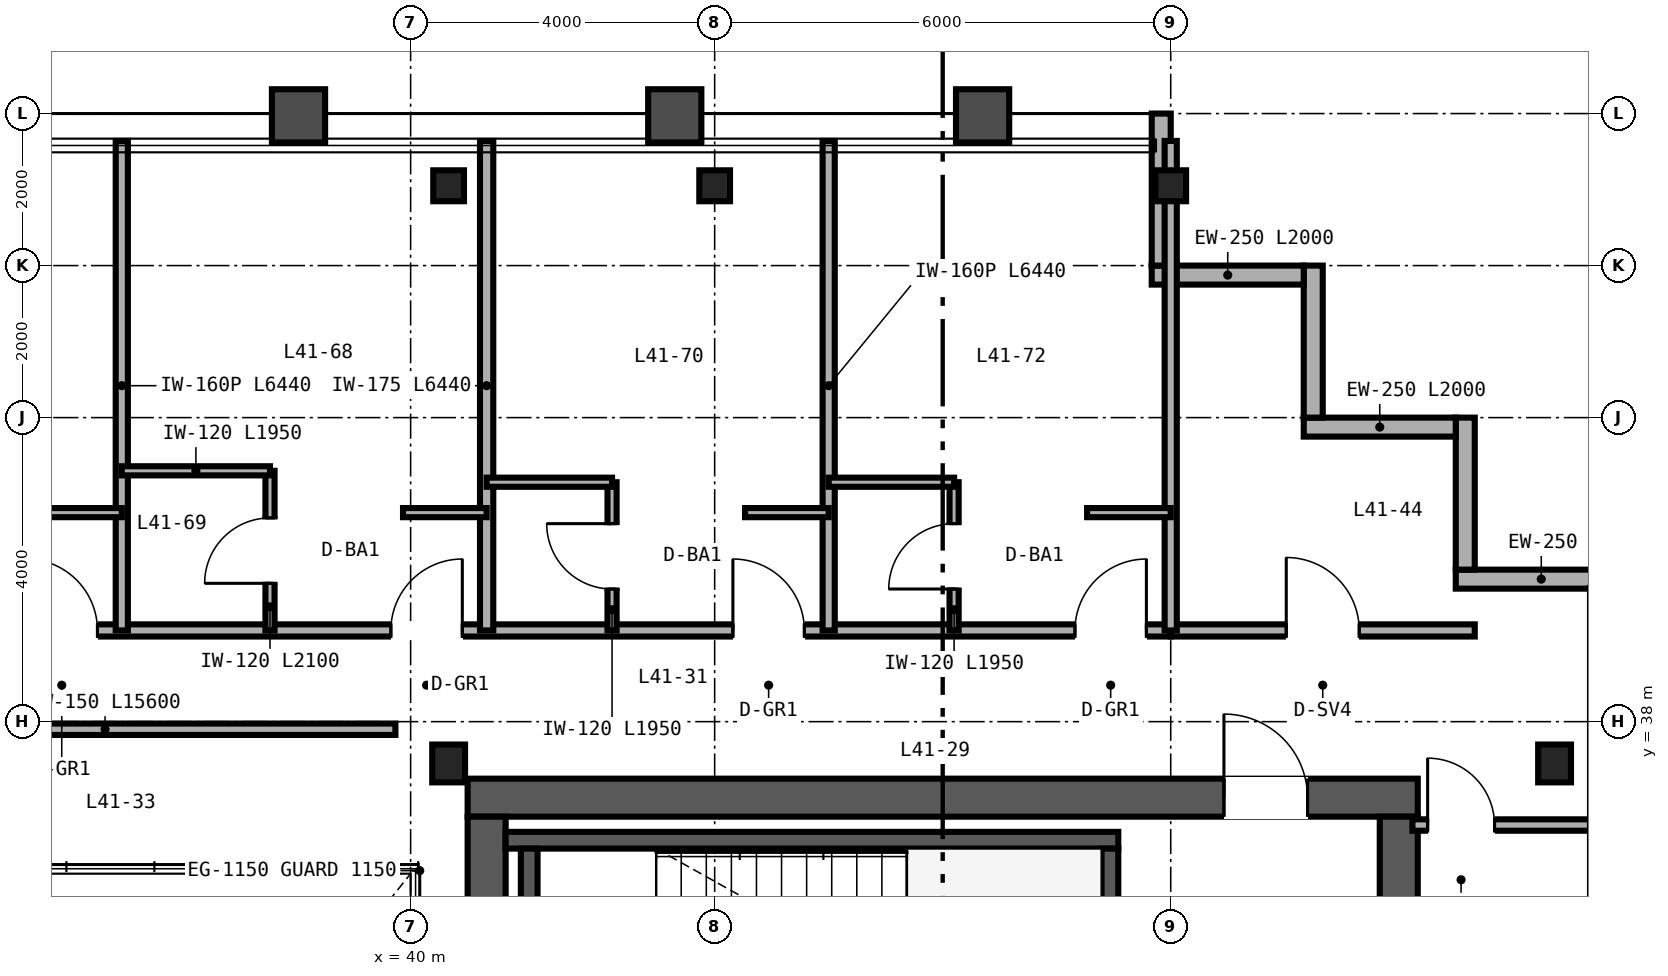
"""IFC4 building model, lengths in metres.
Left out: names, types, materials, properties, quantities, classifications, styles, units other than length and angle.
Written with IfcOpenShell. Run it as: python <this file> out.ifc"""

import sys

from ifc_helpers import new_model, si_unit, direction, frame, frame_2d, origin, origin_2d, place, context, subcontext, project, spatial, rectangle, i_section, extrude, source, transform, mapped, element, fill, save


model = new_model("IFC4")
c1 = context("Model", 3, precision=1e-05, world=origin(), true_north=direction((0.0, 1.0)))
c2 = subcontext(c1, "Body", "Model", "MODEL_VIEW")
j1 = project(units=[si_unit("LENGTHUNIT", "METRE"), si_unit("PLANEANGLEUNIT", "RADIAN")], contexts=[c1])
p1 = place(None, origin())
s1 = spatial("IfcSite", under=j1, at=p1, CompositionType="ELEMENT")
p2 = place(p1, origin())
s2 = spatial("IfcBuilding", under=s1, at=p2, CompositionType="ELEMENT")
p3 = place(p2, frame((0.0, 0.0, 166.8)))
s3 = spatial("IfcBuildingStorey", under=s2, at=p3, CompositionType="ELEMENT", Elevation=166.8)
p4 = place(p3, frame((40.75, 37.0, 0.0), z_axis=(0.0, 0.0, 1.0), x_axis=(1.0, 0.0, 0.0)))
e1 = element("IfcWall", 1, at=p4, inside=s3, PredefinedType="SHEAR", context=c2, shape_type="SweptSolid", body=[
    extrude(rectangle(XDim=12.5, YDim=0.5, at=frame_2d((6.25, 0.0))), origin(), (0.0, 0.0, 1.0), 3.37),
])
p5 = place(p4, frame((9.95, 0.0, 0.0)))
e2 = element("IfcOpeningElement", 2, at=p5, cuts=e1, PredefinedType="OPENING", context=c2, shape_type="SweptSolid", body=[
    extrude(rectangle(XDim=1.1, YDim=2.15, at=frame_2d((0.55, 1.075))), frame((0.0, 0.26, 0.0), z_axis=(0.0, -1.0, 0.0), x_axis=(1.0, 0.0, 0.0)), (0.0, 0.0, 1.0), 0.52),
])
for number, where, z_axis, x_axis in (
    (3, (41.0, 15.25, 0.0), (0.0, 0.0, 1.0), (0.0, 1.0, 0.0)),
    (4, (53.0, 15.25, 0.0), (0.0, 0.0, 1.0), (0.0, 1.0, 0.0)),
):
    element("IfcWall", number, at=place(p3, frame(where, z_axis=z_axis, x_axis=x_axis)), inside=s3, PredefinedType="SHEAR", context=c2, shape_type="SweptSolid", body=[
        extrude(rectangle(XDim=21.5, YDim=0.5, at=frame_2d((10.75, 0.0))), origin(), (0.0, 0.0, 1.0), 3.37),
    ])
p6 = place(p3, frame((41.25, 36.44, 0.0), z_axis=(0.0, 0.0, 1.0), x_axis=(1.0, 0.0, 0.0)))
e5 = element("IfcWall", 5, at=p6, inside=s3, PredefinedType="SHEAR", context=c2, shape_type="SweptSolid", body=[
    extrude(rectangle(XDim=8.06, YDim=0.22, at=frame_2d((4.03, 0.0))), origin(), (0.0, 0.0, 1.0), 3.4),
])
for number, where, z_axis, x_axis in (
    (6, (41.56, 33.05, 0.0), (0.0, 0.0, 1.0), (0.0, 1.0, 0.0)),
    (7, (49.2, 33.05, 0.0), (0.0, 0.0, 1.0), (0.0, 1.0, 0.0)),
):
    element("IfcWall", number, at=place(p3, frame(where, z_axis=z_axis, x_axis=x_axis)), inside=s3, PredefinedType="SHEAR", context=c2, shape_type="SweptSolid", body=[
        extrude(rectangle(XDim=3.28, YDim=0.22, at=frame_2d((1.64, 0.0))), origin(), (0.0, 0.0, 1.0), 3.4),
    ])
m1 = source(origin(), c2, "Body", "SweptSolid", [
    extrude(i_section(OverallWidth=0.432, OverallDepth=0.498, WebThickness=0.056, FlangeThickness=0.089, FilletRadius=0.025, at=origin_2d()), origin(), (0.0, 0.0, 1.0), 3.37),
])
for number, where, z_axis, x_axis in (
    (8, (40.5, 37.45, 0.0), (0.0, 0.0, 1.0), (1.0, 0.0, 0.0)),
    (9, (55.05, 37.45, 0.0), (0.0, 0.0, 1.0), (1.0, 0.0, 0.0)),
):
    element("IfcColumn", number, at=place(p3, frame(where, z_axis=z_axis, x_axis=x_axis)), inside=s3, PredefinedType="COLUMN", context=c2, shape_type="MappedRepresentation", body=[
        mapped(m1, transform((0.0, 0.0, 0.0), scale=1.0)),
    ])
m2 = source(origin(), c2, "Body", "SweptSolid", [
    extrude(i_section(OverallWidth=0.404, OverallDepth=0.407, WebThickness=0.027, FlangeThickness=0.044, FilletRadius=0.025, at=origin_2d()), origin(), (0.0, 0.0, 1.0), 3.37),
])
for number, where, z_axis, x_axis in (
    (10, (40.5, 45.05, 0.0), (0.0, 0.0, 1.0), (1.0, 0.0, 0.0)),
    (11, (44.0, 45.05, 0.0), (0.0, 0.0, 1.0), (1.0, 0.0, 0.0)),
    (12, (50.0, 45.05, 0.0), (0.0, 0.0, 1.0), (1.0, 0.0, 0.0)),
):
    element("IfcColumn", number, at=place(p3, frame(where, z_axis=z_axis, x_axis=x_axis)), inside=s3, PredefinedType="COLUMN", context=c2, shape_type="MappedRepresentation", body=[
        mapped(m2, transform((0.0, 0.0, 0.0), scale=1.0)),
    ])
p7 = place(p3, frame((56.0, 39.875, 0.0), z_axis=(0.0, 0.0, 1.0), x_axis=(-1.0, 0.0, 0.0)))
e13 = element("IfcWall", 13, at=p7, inside=s3, PredefinedType="SOLIDWALL", context=c2, shape_type="SweptSolid", body=[
    extrude(rectangle(XDim=2.25, YDim=0.25, at=frame_2d((1.125, 0.0))), origin(), (0.0, 0.0, 1.0), 3.37),
])
for number, where, z_axis, x_axis in (
    (14, (53.875, 40.0, 0.0), (0.0, 0.0, 1.0), (0.0, 1.0, 0.0)),
    (15, (53.75, 41.875, 0.0), (0.0, 0.0, 1.0), (-1.0, 0.0, 0.0)),
    (16, (51.875, 42.0, 0.0), (0.0, 0.0, 1.0), (0.0, 1.0, 0.0)),
    (17, (51.75, 43.875, 0.0), (0.0, 0.0, 1.0), (-1.0, 0.0, 0.0)),
):
    element("IfcWall", number, at=place(p3, frame(where, z_axis=z_axis, x_axis=x_axis)), inside=s3, PredefinedType="SOLIDWALL", context=c2, shape_type="SweptSolid", body=[
        extrude(rectangle(XDim=2.0, YDim=0.25, at=frame_2d((1.0, 0.0))), origin(), (0.0, 0.0, 1.0), 3.37),
    ])
p8 = place(p3, frame((49.875, 44.0, 0.0), z_axis=(0.0, 0.0, 1.0), x_axis=(0.0, 1.0, 0.0)))
e18 = element("IfcWall", 18, at=p8, inside=s3, PredefinedType="SOLIDWALL", context=c2, shape_type="SweptSolid", body=[
    extrude(rectangle(XDim=2.0, YDim=0.25, at=frame_2d((1.0, 0.0))), origin(), (0.0, 0.0, 1.0), 2.677),
])
p9 = place(p3, frame((24.2, 37.9, 0.0), z_axis=(0.0, 0.0, 1.0), x_axis=(1.0, 0.0, 0.0)))
e19 = element("IfcWall", 19, at=p9, inside=s3, PredefinedType="PARTITIONING", context=c2, shape_type="SweptSolid", body=[
    extrude(rectangle(XDim=15.6, YDim=0.15, at=frame_2d((7.8, 0.0))), origin(), (0.0, 0.0, 1.0), 3.37),
])
p10 = place(p9, frame((7.0, 0.0, 0.0)))
e20 = element("IfcOpeningElement", 20, at=p10, cuts=e19, PredefinedType="OPENING", context=c2, shape_type="SweptSolid", body=[
    extrude(rectangle(XDim=0.96, YDim=2.15, at=frame_2d((0.48, 1.075))), frame((0.0, 0.085, 0.0), z_axis=(0.0, -1.0, 0.0), x_axis=(1.0, 0.0, 0.0)), (0.0, 0.0, 1.0), 0.17),
])
p11 = place(p3, frame((53.18, 36.64, 0.0), z_axis=(0.0, 0.0, 1.0), x_axis=(1.0, 0.0, 0.0)))
e21 = element("IfcWall", 21, at=p11, inside=s3, PredefinedType="PARTITIONING", context=c2, shape_type="SweptSolid", body=[
    extrude(rectangle(XDim=2.66, YDim=0.15, at=frame_2d((1.33, 0.0))), origin(), (0.0, 0.0, 1.0), 2.753),
])
p12 = place(p11, frame((0.2, 0.0, 0.0)))
e22 = element("IfcOpeningElement", 22, at=p12, cuts=e21, PredefinedType="OPENING", context=c2, shape_type="SweptSolid", body=[
    extrude(rectangle(XDim=0.88, YDim=2.15, at=frame_2d((0.44, 1.075))), frame((0.0, 0.085, 0.0), z_axis=(0.0, -1.0, 0.0), x_axis=(1.0, 0.0, 0.0)), (0.0, 0.0, 1.0), 0.17),
])
p13 = place(p3, frame((50.0, 39.2, 0.0), z_axis=(0.0, 0.0, 1.0), x_axis=(1.0, 0.0, 0.0)))
e23 = element("IfcWall", 23, at=p13, inside=s3, PredefinedType="PARTITIONING", context=c2, shape_type="SweptSolid", body=[
    extrude(rectangle(XDim=4.0, YDim=0.16, at=frame_2d((2.0, 0.0))), origin(), (0.0, 0.0, 1.0), 3.37),
])
p14 = place(p13, frame((1.52, 0.0, 0.0)))
e24 = element("IfcOpeningElement", 24, at=p14, cuts=e23, PredefinedType="OPENING", context=c2, shape_type="SweptSolid", body=[
    extrude(rectangle(XDim=0.96, YDim=2.15, at=frame_2d((0.48, 1.075))), frame((0.0, 0.09, 0.0), z_axis=(0.0, -1.0, 0.0), x_axis=(1.0, 0.0, 0.0)), (0.0, 0.0, 1.0), 0.18),
])
p15 = place(p3, frame((14.0, 39.2, 0.0), z_axis=(0.0, 0.0, 1.0), x_axis=(1.0, 0.0, 0.0)))
e25 = element("IfcWall", 25, at=p15, inside=s3, PredefinedType="PARTITIONING", context=c2, shape_type="SweptSolid", body=[
    extrude(rectangle(XDim=36.0, YDim=0.16, at=frame_2d((18.0, 0.0))), origin(), (0.0, 0.0, 1.0), 2.913),
])
p16 = place(p15, frame((3.14, 0.0, 0.0)))
e26 = element("IfcOpeningElement", 26, at=p16, cuts=e25, PredefinedType="OPENING", context=c2, shape_type="SweptSolid", body=[
    extrude(rectangle(XDim=0.94, YDim=2.15, at=frame_2d((0.47, 1.075))), frame((0.0, 0.09, 0.0), z_axis=(0.0, -1.0, 0.0), x_axis=(1.0, 0.0, 0.0)), (0.0, 0.0, 1.0), 0.18),
])
p17 = place(p15, frame((7.54, 0.0, 0.0)))
e27 = element("IfcOpeningElement", 27, at=p17, cuts=e25, PredefinedType="OPENING", context=c2, shape_type="SweptSolid", body=[
    extrude(rectangle(XDim=0.94, YDim=2.15, at=frame_2d((0.47, 1.075))), frame((0.0, 0.09, 0.0), z_axis=(0.0, -1.0, 0.0), x_axis=(1.0, 0.0, 0.0)), (0.0, 0.0, 1.0), 0.18),
])
p18 = place(p15, frame((11.94, 0.0, 0.0)))
e28 = element("IfcOpeningElement", 28, at=p18, cuts=e25, PredefinedType="OPENING", context=c2, shape_type="SweptSolid", body=[
    extrude(rectangle(XDim=0.94, YDim=2.15, at=frame_2d((0.47, 1.075))), frame((0.0, 0.09, 0.0), z_axis=(0.0, -1.0, 0.0), x_axis=(1.0, 0.0, 0.0)), (0.0, 0.0, 1.0), 0.18),
])
p19 = place(p15, frame((16.34, 0.0, 0.0)))
e29 = element("IfcOpeningElement", 29, at=p19, cuts=e25, PredefinedType="OPENING", context=c2, shape_type="SweptSolid", body=[
    extrude(rectangle(XDim=0.94, YDim=2.15, at=frame_2d((0.47, 1.075))), frame((0.0, 0.09, 0.0), z_axis=(0.0, -1.0, 0.0), x_axis=(1.0, 0.0, 0.0)), (0.0, 0.0, 1.0), 0.18),
])
p20 = place(p15, frame((20.94, 0.0, 0.0)))
e30 = element("IfcOpeningElement", 30, at=p20, cuts=e25, PredefinedType="OPENING", context=c2, shape_type="SweptSolid", body=[
    extrude(rectangle(XDim=0.94, YDim=2.15, at=frame_2d((0.47, 1.075))), frame((0.0, 0.09, 0.0), z_axis=(0.0, -1.0, 0.0), x_axis=(1.0, 0.0, 0.0)), (0.0, 0.0, 1.0), 0.18),
])
p21 = place(p15, frame((25.74, 0.0, 0.0)))
e31 = element("IfcOpeningElement", 31, at=p21, cuts=e25, PredefinedType="OPENING", context=c2, shape_type="SweptSolid", body=[
    extrude(rectangle(XDim=0.94, YDim=2.15, at=frame_2d((0.47, 1.075))), frame((0.0, 0.09, 0.0), z_axis=(0.0, -1.0, 0.0), x_axis=(1.0, 0.0, 0.0)), (0.0, 0.0, 1.0), 0.18),
])
p22 = place(p15, frame((30.24, 0.0, 0.0)))
e32 = element("IfcOpeningElement", 32, at=p22, cuts=e25, PredefinedType="OPENING", context=c2, shape_type="SweptSolid", body=[
    extrude(rectangle(XDim=0.94, YDim=2.15, at=frame_2d((0.47, 1.075))), frame((0.0, 0.09, 0.0), z_axis=(0.0, -1.0, 0.0), x_axis=(1.0, 0.0, 0.0)), (0.0, 0.0, 1.0), 0.18),
])
p23 = place(p15, frame((34.74, 0.0, 0.0)))
e33 = element("IfcOpeningElement", 33, at=p23, cuts=e25, PredefinedType="OPENING", context=c2, shape_type="SweptSolid", body=[
    extrude(rectangle(XDim=0.94, YDim=2.15, at=frame_2d((0.47, 1.075))), frame((0.0, 0.09, 0.0), z_axis=(0.0, -1.0, 0.0), x_axis=(1.0, 0.0, 0.0)), (0.0, 0.0, 1.0), 0.18),
])
p24 = place(p3, frame((50.0, 39.2, 0.0), z_axis=(0.0, 0.0, 1.0), x_axis=(0.0, 1.0, 0.0)))
e34 = element("IfcWall", 34, at=p24, inside=s3, PredefinedType="PARTITIONING", context=c2, shape_type="SweptSolid", body=[
    extrude(rectangle(XDim=6.44, YDim=0.16, at=frame_2d((3.22, 0.0))), origin(), (0.0, 0.0, 1.0), 2.677),
])
p25 = place(p3, frame((36.2, 39.2, 0.0), z_axis=(0.0, 0.0, 1.0), x_axis=(0.0, 1.0, 0.0)))
e35 = element("IfcWall", 35, at=p25, inside=s3, PredefinedType="PARTITIONING", context=c2, shape_type="SweptSolid", body=[
    extrude(rectangle(XDim=6.44, YDim=0.16, at=frame_2d((3.22, 0.0))), origin(), (0.0, 0.0, 1.0), 2.443),
])
p26 = place(p3, frame((35.1, 40.75, 0.0), z_axis=(0.0, 0.0, 1.0), x_axis=(1.0, 0.0, 0.0)))
e36 = element("IfcWall", 36, at=p26, inside=s3, PredefinedType="PARTITIONING", context=c2, shape_type="SweptSolid", body=[
    extrude(rectangle(XDim=1.1, YDim=0.12, at=frame_2d((0.55, 0.0))), origin(), (0.0, 0.0, 1.0), 3.37),
])
p27 = place(p3, frame((41.0, 39.2, 0.0), z_axis=(0.0, 0.0, 1.0), x_axis=(0.0, 1.0, 0.0)))
e37 = element("IfcWall", 37, at=p27, inside=s3, PredefinedType="PARTITIONING", context=c2, shape_type="SweptSolid", body=[
    extrude(rectangle(XDim=6.44, YDim=0.175, at=frame_2d((3.22, 0.0))), origin(), (0.0, 0.0, 1.0), 2.833),
])
p28 = place(p3, frame((38.15, 39.2, 0.0), z_axis=(0.0, 0.0, 1.0), x_axis=(0.0, 1.0, 0.0)))
e38 = element("IfcWall", 38, at=p28, inside=s3, PredefinedType="PARTITIONING", context=c2, shape_type="SweptSolid", body=[
    extrude(rectangle(XDim=2.1, YDim=0.12, at=frame_2d((1.05, 0.0))), origin(), (0.0, 0.0, 1.0), 3.37),
])
p29 = place(p28, frame((0.62, 0.0, 0.0)))
e39 = element("IfcOpeningElement", 39, at=p29, cuts=e38, PredefinedType="OPENING", context=c2, shape_type="SweptSolid", body=[
    extrude(rectangle(XDim=0.86, YDim=2.1, at=frame_2d((0.43, 1.05))), frame((0.0, 0.07, 0.0), z_axis=(0.0, -1.0, 0.0), x_axis=(1.0, 0.0, 0.0)), (0.0, 0.0, 1.0), 0.14),
])
p30 = place(p3, frame((36.2, 41.3, 0.0), z_axis=(0.0, 0.0, 1.0), x_axis=(1.0, 0.0, 0.0)))
e40 = element("IfcWall", 40, at=p30, inside=s3, PredefinedType="PARTITIONING", context=c2, shape_type="SweptSolid", body=[
    extrude(rectangle(XDim=1.95, YDim=0.12, at=frame_2d((0.975, 0.0))), origin(), (0.0, 0.0, 1.0), 3.37),
])
p31 = place(p3, frame((39.9, 40.75, 0.0), z_axis=(0.0, 0.0, 1.0), x_axis=(1.0, 0.0, 0.0)))
e41 = element("IfcWall", 41, at=p31, inside=s3, PredefinedType="PARTITIONING", context=c2, shape_type="SweptSolid", body=[
    extrude(rectangle(XDim=1.1, YDim=0.12, at=frame_2d((0.55, 0.0))), origin(), (0.0, 0.0, 1.0), 2.913),
])
p32 = place(p3, frame((45.5, 39.2, 0.0), z_axis=(0.0, 0.0, 1.0), x_axis=(0.0, 1.0, 0.0)))
e42 = element("IfcWall", 42, at=p32, inside=s3, PredefinedType="PARTITIONING", context=c2, shape_type="SweptSolid", body=[
    extrude(rectangle(XDim=6.44, YDim=0.16, at=frame_2d((3.22, 0.0))), origin(), (0.0, 0.0, 1.0), 2.677),
])
p33 = place(p3, frame((42.65, 39.2, 0.0), z_axis=(0.0, 0.0, 1.0), x_axis=(0.0, 1.0, 0.0)))
e43 = element("IfcWall", 43, at=p33, inside=s3, PredefinedType="PARTITIONING", context=c2, shape_type="SweptSolid", body=[
    extrude(rectangle(XDim=1.95, YDim=0.12, at=frame_2d((0.975, 0.0))), origin(), (0.0, 0.0, 1.0), 3.37),
])
p34 = place(p33, frame((0.545, 0.0, 0.0)))
e44 = element("IfcOpeningElement", 44, at=p34, cuts=e43, PredefinedType="OPENING", context=c2, shape_type="SweptSolid", body=[
    extrude(rectangle(XDim=0.86, YDim=2.1, at=frame_2d((0.43, 1.05))), frame((0.0, 0.07, 0.0), z_axis=(0.0, -1.0, 0.0), x_axis=(1.0, 0.0, 0.0)), (0.0, 0.0, 1.0), 0.14),
])
p35 = place(p3, frame((41.0, 41.15, 0.0), z_axis=(0.0, 0.0, 1.0), x_axis=(1.0, 0.0, 0.0)))
e45 = element("IfcWall", 45, at=p35, inside=s3, PredefinedType="PARTITIONING", context=c2, shape_type="SweptSolid", body=[
    extrude(rectangle(XDim=1.65, YDim=0.12, at=frame_2d((0.825, 0.0))), origin(), (0.0, 0.0, 1.0), 3.37),
])
p36 = place(p3, frame((44.4, 40.75, 0.0), z_axis=(0.0, 0.0, 1.0), x_axis=(1.0, 0.0, 0.0)))
e46 = element("IfcWall", 46, at=p36, inside=s3, PredefinedType="PARTITIONING", context=c2, shape_type="SweptSolid", body=[
    extrude(rectangle(XDim=1.1, YDim=0.12, at=frame_2d((0.55, 0.0))), origin(), (0.0, 0.0, 1.0), 3.37),
])
p37 = place(p3, frame((47.15, 39.2, 0.0), z_axis=(0.0, 0.0, 1.0), x_axis=(0.0, 1.0, 0.0)))
e47 = element("IfcWall", 47, at=p37, inside=s3, PredefinedType="PARTITIONING", context=c2, shape_type="SweptSolid", body=[
    extrude(rectangle(XDim=1.95, YDim=0.12, at=frame_2d((0.975, 0.0))), origin(), (0.0, 0.0, 1.0), 3.37),
])
p38 = place(p37, frame((0.545, 0.0, 0.0)))
e48 = element("IfcOpeningElement", 48, at=p38, cuts=e47, PredefinedType="OPENING", context=c2, shape_type="SweptSolid", body=[
    extrude(rectangle(XDim=0.86, YDim=2.1, at=frame_2d((0.43, 1.05))), frame((0.0, 0.07, 0.0), z_axis=(0.0, -1.0, 0.0), x_axis=(1.0, 0.0, 0.0)), (0.0, 0.0, 1.0), 0.14),
])
p39 = place(p3, frame((45.5, 41.15, 0.0), z_axis=(0.0, 0.0, 1.0), x_axis=(1.0, 0.0, 0.0)))
e49 = element("IfcWall", 49, at=p39, inside=s3, PredefinedType="PARTITIONING", context=c2, shape_type="SweptSolid", body=[
    extrude(rectangle(XDim=1.65, YDim=0.12, at=frame_2d((0.825, 0.0))), origin(), (0.0, 0.0, 1.0), 3.37),
])
p40 = place(p3, frame((48.9, 40.75, 0.0), z_axis=(0.0, 0.0, 1.0), x_axis=(1.0, 0.0, 0.0)))
e50 = element("IfcWall", 50, at=p40, inside=s3, PredefinedType="PARTITIONING", context=c2, shape_type="SweptSolid", body=[
    extrude(rectangle(XDim=1.1, YDim=0.12, at=frame_2d((0.55, 0.0))), origin(), (0.0, 0.0, 1.0), 3.37),
])
m3 = source(origin(), c2, "Body", "SweptSolid", [
    extrude(rectangle(XDim=1.1, YDim=2.15, at=frame_2d((0.55, 1.075))), frame((0.0, 0.025, 0.0), z_axis=(0.0, -1.0, 0.0), x_axis=(1.0, 0.0, 0.0)), (0.0, 0.0, 1.0), 0.05),
])
p41 = place(p5, origin())
e51 = element("IfcDoor", 51, at=p41, inside=s3, OperationType="SINGLE_SWING_LEFT", PredefinedType="DOOR", context=c2, shape_type="MappedRepresentation", body=[
    mapped(m3, transform((0.0, 0.0, 0.0), scale=1.0)),
])
fill(e2, e51)
m4 = source(origin(), c2, "Body", "SweptSolid", [
    extrude(rectangle(XDim=0.88, YDim=2.15, at=frame_2d((0.44, 1.075))), frame((0.0, 0.025, 0.0), z_axis=(0.0, -1.0, 0.0), x_axis=(1.0, 0.0, 0.0)), (0.0, 0.0, 1.0), 0.05),
])
p42 = place(p12, origin())
e52 = element("IfcDoor", 52, at=p42, inside=s3, OperationType="SINGLE_SWING_LEFT", PredefinedType="DOOR", context=c2, shape_type="MappedRepresentation", body=[
    mapped(m4, transform((0.0, 0.0, 0.0), scale=1.0)),
])
fill(e22, e52)
m5 = source(origin(), c2, "Body", "SweptSolid", [
    extrude(rectangle(XDim=0.96, YDim=2.15, at=frame_2d((0.48, 1.075))), frame((0.0, 0.025, 0.0), z_axis=(0.0, -1.0, 0.0), x_axis=(1.0, 0.0, 0.0)), (0.0, 0.0, 1.0), 0.05),
])
p43 = place(p14, origin())
e53 = element("IfcDoor", 53, at=p43, inside=s3, OperationType="SINGLE_SWING_LEFT", PredefinedType="DOOR", context=c2, shape_type="MappedRepresentation", body=[
    mapped(m5, transform((0.0, 0.0, 0.0), scale=1.0)),
])
fill(e24, e53)
m6 = source(origin(), c2, "Body", "SweptSolid", [
    extrude(rectangle(XDim=0.86, YDim=2.1, at=frame_2d((0.43, 1.05))), frame((0.0, 0.025, 0.0), z_axis=(0.0, -1.0, 0.0), x_axis=(1.0, 0.0, 0.0)), (0.0, 0.0, 1.0), 0.05),
])
p44 = place(p29, origin())
e54 = element("IfcDoor", 54, at=p44, inside=s3, OperationType="SINGLE_SWING_LEFT", PredefinedType="DOOR", context=c2, shape_type="MappedRepresentation", body=[
    mapped(m6, transform((0.0, 0.0, 0.0), scale=1.0)),
])
fill(e39, e54)
p45 = place(p34, origin())
e55 = element("IfcDoor", 55, at=p45, inside=s3, OperationType="SINGLE_SWING_RIGHT", PredefinedType="DOOR", context=c2, shape_type="MappedRepresentation", body=[
    mapped(m6, transform((0.0, 0.0, 0.0), scale=1.0)),
])
fill(e44, e55)
p46 = place(p38, origin())
e56 = element("IfcDoor", 56, at=p46, inside=s3, OperationType="SINGLE_SWING_LEFT", PredefinedType="DOOR", context=c2, shape_type="MappedRepresentation", body=[
    mapped(m6, transform((0.0, 0.0, 0.0), scale=1.0)),
])
fill(e48, e56)
m7 = source(origin(), c2, "Body", "SweptSolid", [
    extrude(rectangle(XDim=0.94, YDim=2.15, at=frame_2d((0.47, 1.075))), frame((0.0, 0.025, 0.0), z_axis=(0.0, -1.0, 0.0), x_axis=(1.0, 0.0, 0.0)), (0.0, 0.0, 1.0), 0.05),
])
p47 = place(p20, origin())
e57 = element("IfcDoor", 57, at=p47, inside=s3, OperationType="SINGLE_SWING_LEFT", PredefinedType="DOOR", context=c2, shape_type="MappedRepresentation", body=[
    mapped(m7, transform((0.0, 0.0, 0.0), scale=1.0)),
])
fill(e30, e57)
p48 = place(p21, origin())
e58 = element("IfcDoor", 58, at=p48, inside=s3, OperationType="SINGLE_SWING_RIGHT", PredefinedType="DOOR", context=c2, shape_type="MappedRepresentation", body=[
    mapped(m7, transform((0.0, 0.0, 0.0), scale=1.0)),
])
fill(e31, e58)
p49 = place(p22, origin())
e59 = element("IfcDoor", 59, at=p49, inside=s3, OperationType="SINGLE_SWING_LEFT", PredefinedType="DOOR", context=c2, shape_type="MappedRepresentation", body=[
    mapped(m7, transform((0.0, 0.0, 0.0), scale=1.0)),
])
fill(e32, e59)
p50 = place(p23, origin())
e60 = element("IfcDoor", 60, at=p50, inside=s3, OperationType="SINGLE_SWING_RIGHT", PredefinedType="DOOR", context=c2, shape_type="MappedRepresentation", body=[
    mapped(m7, transform((0.0, 0.0, 0.0), scale=1.0)),
])
fill(e33, e60)
save(model, sys.argv[1])
